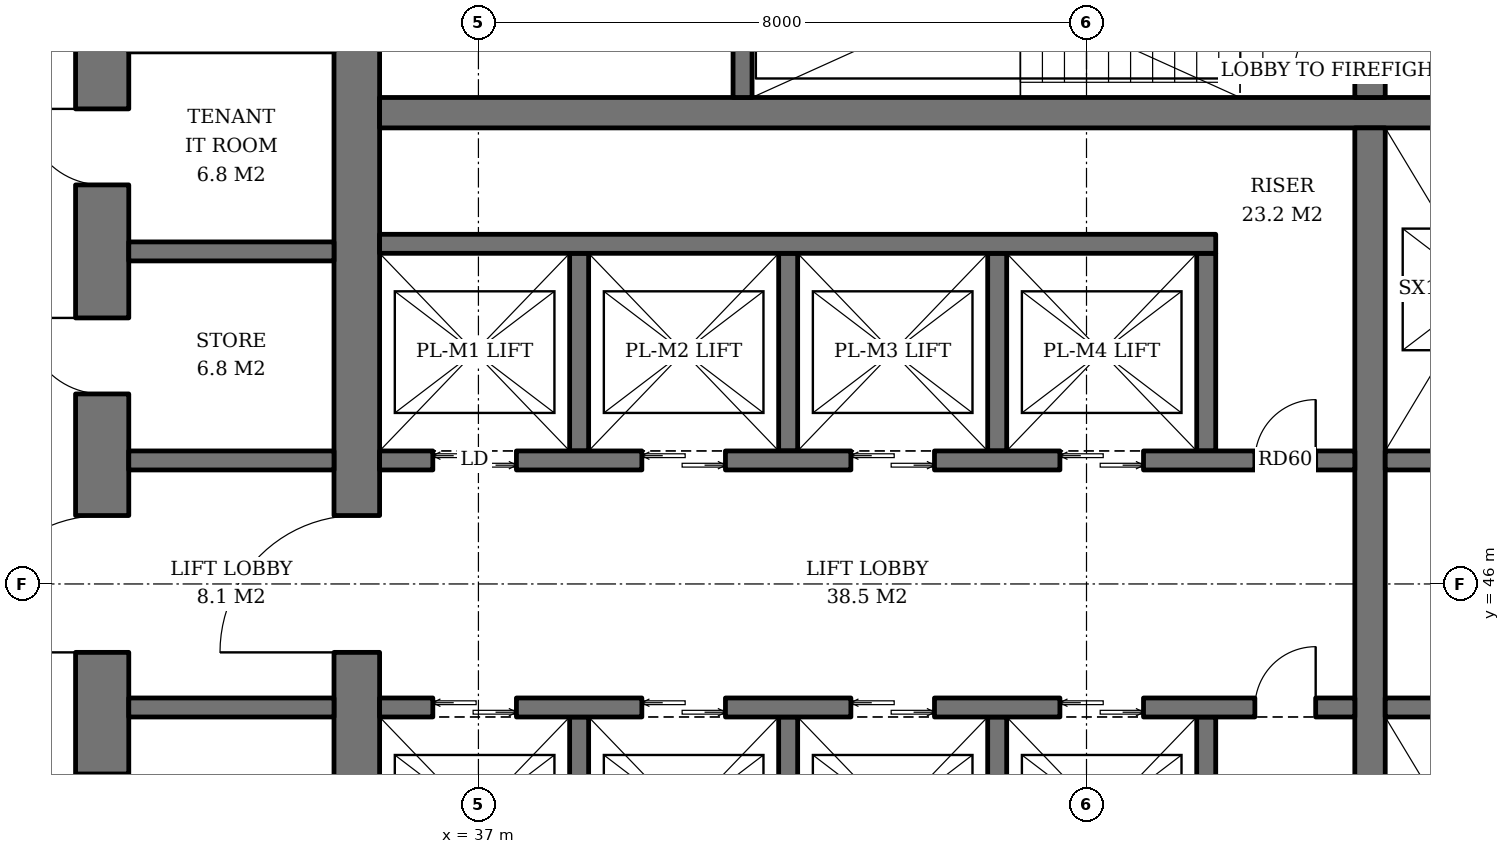
"""IFC4 building model, lengths in metres.
Left out: names, types, materials, properties, quantities, classifications, styles, units other than length and angle.
Written with IfcOpenShell. Run it as: python <this file> out.ifc"""

import sys

from ifc_helpers import new_model, si_unit, direction, frame, frame_2d, origin, place, context, subcontext, project, spatial, rectangle, extrude, element, fill, save


model = new_model("IFC4")
c1 = context("Model", 3, precision=1e-05, world=origin(), true_north=direction((0.0, 1.0)))
c2 = subcontext(c1, "Body", "Model", "MODEL_VIEW")
j1 = project(units=[si_unit("LENGTHUNIT", "METRE"), si_unit("PLANEANGLEUNIT", "RADIAN")], contexts=[c1])
p1 = place(None, origin())
s1 = spatial("IfcSite", under=j1, at=p1, CompositionType="ELEMENT")
p2 = place(p1, origin())
s2 = spatial("IfcBuilding", under=s1, at=p2, CompositionType="ELEMENT")
p3 = place(p2, frame((0.0, 0.0, 142.6)))
s3 = spatial("IfcBuildingStorey", under=s2, at=p3, CompositionType="ELEMENT", Elevation=142.6)
p4 = place(p3, frame((35.4, 36.7, 0.0), z_axis=(0.0, 0.0, 1.0), x_axis=(0.0, 1.0, 0.0)))
e1 = element("IfcWall", 1, at=p4, inside=s3, PredefinedType="SHEAR", context=c2, shape_type="SweptSolid", body=[
    extrude(rectangle(XDim=18.6, YDim=0.6, at=frame_2d((9.3, 0.0))), origin(), (0.0, 0.0, 1.0), 3.8),
])
p5 = place(p4, frame((8.4, 0.0, 0.0)))
e2 = element("IfcOpeningElement", 2, at=p5, cuts=e1, PredefinedType="OPENING", context=c2, shape_type="SweptSolid", body=[
    extrude(rectangle(XDim=1.8, YDim=2.4, at=frame_2d((0.9, 1.2))), frame((0.0, 0.31, 0.0), z_axis=(0.0, -1.0, 0.0), x_axis=(1.0, 0.0, 0.0)), (0.0, 0.0, 1.0), 0.62),
])
p6 = place(p3, frame((32.05, 33.4, 0.0), z_axis=(0.0, 0.0, 1.0), x_axis=(0.0, 1.0, 0.0)))
e3 = element("IfcWall", 3, at=p6, inside=s3, PredefinedType="SHEAR", context=c2, shape_type="SweptSolid", body=[
    extrude(rectangle(XDim=25.2, YDim=0.7, at=frame_2d((12.6, 0.0))), origin(), (0.0, 0.0, 1.0), 3.8),
])
p7 = place(p6, frame((11.7, 0.0, 0.0)))
e4 = element("IfcOpeningElement", 4, at=p7, cuts=e3, PredefinedType="OPENING", context=c2, shape_type="SweptSolid", body=[
    extrude(rectangle(XDim=1.8, YDim=2.4, at=frame_2d((0.9, 1.2))), frame((0.0, 0.36, 0.0), z_axis=(0.0, -1.0, 0.0), x_axis=(1.0, 0.0, 0.0)), (0.0, 0.0, 1.0), 0.72),
])
p8 = place(p6, frame((3.6, 0.0, 0.0)))
e5 = element("IfcOpeningElement", 5, at=p8, cuts=e3, PredefinedType="OPENING", context=c2, shape_type="SweptSolid", body=[
    extrude(rectangle(XDim=1.0, YDim=2.1, at=frame_2d((0.5, 1.05))), frame((0.0, 0.36, 0.0), z_axis=(0.0, -1.0, 0.0), x_axis=(1.0, 0.0, 0.0)), (0.0, 0.0, 1.0), 0.72),
])
p9 = place(p6, frame((6.35, 0.0, 0.0)))
e6 = element("IfcOpeningElement", 6, at=p9, cuts=e3, PredefinedType="OPENING", context=c2, shape_type="SweptSolid", body=[
    extrude(rectangle(XDim=1.0, YDim=2.1, at=frame_2d((0.5, 1.05))), frame((0.0, 0.36, 0.0), z_axis=(0.0, -1.0, 0.0), x_axis=(1.0, 0.0, 0.0)), (0.0, 0.0, 1.0), 0.72),
])
p10 = place(p6, frame((9.1, 0.0, 0.0)))
e7 = element("IfcOpeningElement", 7, at=p10, cuts=e3, PredefinedType="OPENING", context=c2, shape_type="SweptSolid", body=[
    extrude(rectangle(XDim=1.0, YDim=2.1, at=frame_2d((0.5, 1.05))), frame((0.0, 0.36, 0.0), z_axis=(0.0, -1.0, 0.0), x_axis=(1.0, 0.0, 0.0)), (0.0, 0.0, 1.0), 0.72),
])
p11 = place(p6, frame((15.1, 0.0, 0.0)))
e8 = element("IfcOpeningElement", 8, at=p11, cuts=e3, PredefinedType="OPENING", context=c2, shape_type="SweptSolid", body=[
    extrude(rectangle(XDim=1.0, YDim=2.1, at=frame_2d((0.5, 1.05))), frame((0.0, 0.36, 0.0), z_axis=(0.0, -1.0, 0.0), x_axis=(1.0, 0.0, 0.0)), (0.0, 0.0, 1.0), 0.72),
])
p12 = place(p6, frame((17.85, 0.0, 0.0)))
e9 = element("IfcOpeningElement", 9, at=p12, cuts=e3, PredefinedType="OPENING", context=c2, shape_type="SweptSolid", body=[
    extrude(rectangle(XDim=1.0, YDim=2.1, at=frame_2d((0.5, 1.05))), frame((0.0, 0.36, 0.0), z_axis=(0.0, -1.0, 0.0), x_axis=(1.0, 0.0, 0.0)), (0.0, 0.0, 1.0), 0.72),
])
p13 = place(p3, frame((35.7, 52.2, 0.0), z_axis=(0.0, 0.0, 1.0), x_axis=(1.0, 0.0, 0.0)))
e10 = element("IfcWall", 10, at=p13, inside=s3, PredefinedType="SHEAR", context=c2, shape_type="SweptSolid", body=[
    extrude(rectangle(XDim=18.6, YDim=0.4, at=frame_2d((9.3, 0.0))), origin(), (0.0, 0.0, 1.0), 3.8),
])
p14 = place(p3, frame((48.73, 40.0, 0.0), z_axis=(0.0, 0.0, 1.0), x_axis=(0.0, 1.0, 0.0)))
e11 = element("IfcWall", 11, at=p14, inside=s3, PredefinedType="SHEAR", context=c2, shape_type="SweptSolid", body=[
    extrude(rectangle(XDim=12.0, YDim=0.4, at=frame_2d((6.0, 0.0))), origin(), (0.0, 0.0, 1.0), 3.8),
])
p15 = place(p3, frame((48.73, 52.4, 0.0), z_axis=(0.0, 0.0, 1.0), x_axis=(0.0, 1.0, 0.0)))
e12 = element("IfcWall", 12, at=p15, inside=s3, PredefinedType="SHEAR", context=c2, shape_type="SweptSolid", body=[
    extrude(rectangle(XDim=2.9, YDim=0.4, at=frame_2d((1.45, 0.0))), origin(), (0.0, 0.0, 1.0), 3.8),
])
p16 = place(p15, frame((0.3, 0.0, 0.0)))
e13 = element("IfcOpeningElement", 13, at=p16, cuts=e12, PredefinedType="OPENING", context=c2, shape_type="SweptSolid", body=[
    extrude(rectangle(XDim=1.0, YDim=2.1, at=frame_2d((0.5, 1.05))), frame((0.0, 0.21, 0.0), z_axis=(0.0, -1.0, 0.0), x_axis=(1.0, 0.0, 0.0)), (0.0, 0.0, 1.0), 0.42),
])
p17 = place(p3, frame((40.475, 52.4, 0.0), z_axis=(0.0, 0.0, 1.0), x_axis=(0.0, 1.0, 0.0)))
e14 = element("IfcWall", 14, at=p17, inside=s3, PredefinedType="SHEAR", context=c2, shape_type="SweptSolid", body=[
    extrude(rectangle(XDim=2.9, YDim=0.25, at=frame_2d((1.45, 0.0))), origin(), (0.0, 0.0, 1.0), 3.8),
])
for number, where, z_axis, x_axis in (
    (15, (38.325, 47.75, 0.0), (0.0, 0.0, 1.0), (0.0, 1.0, 0.0)),
    (16, (41.075, 47.75, 0.0), (0.0, 0.0, 1.0), (0.0, 1.0, 0.0)),
    (17, (43.825, 47.75, 0.0), (0.0, 0.0, 1.0), (0.0, 1.0, 0.0)),
    (18, (46.575, 47.75, 0.0), (0.0, 0.0, 1.0), (0.0, 1.0, 0.0)),
):
    element("IfcWall", number, at=place(p3, frame(where, z_axis=z_axis, x_axis=x_axis)), inside=s3, PredefinedType="SHEAR", context=c2, shape_type="SweptSolid", body=[
        extrude(rectangle(XDim=2.6, YDim=0.25, at=frame_2d((1.3, 0.0))), origin(), (0.0, 0.0, 1.0), 3.8),
    ])
p18 = place(p3, frame((35.7, 50.475, 0.0), z_axis=(0.0, 0.0, 1.0), x_axis=(1.0, 0.0, 0.0)))
e19 = element("IfcWall", 19, at=p18, inside=s3, PredefinedType="SHEAR", context=c2, shape_type="SweptSolid", body=[
    extrude(rectangle(XDim=11.0, YDim=0.25, at=frame_2d((5.5, 0.0))), origin(), (0.0, 0.0, 1.0), 3.8),
])
p19 = place(p3, frame((35.7, 47.625, 0.0), z_axis=(0.0, 0.0, 1.0), x_axis=(1.0, 0.0, 0.0)))
e20 = element("IfcWall", 20, at=p19, inside=s3, PredefinedType="SHEAR", context=c2, shape_type="SweptSolid", body=[
    extrude(rectangle(XDim=12.83, YDim=0.25, at=frame_2d((6.415, 0.0))), origin(), (0.0, 0.0, 1.0), 3.8),
])
p20 = place(p19, frame((0.7, 0.0, 0.0)))
e21 = element("IfcOpeningElement", 21, at=p20, cuts=e20, PredefinedType="OPENING", context=c2, shape_type="SweptSolid", body=[
    extrude(rectangle(XDim=1.1, YDim=2.2, at=frame_2d((0.55, 1.1))), frame((0.0, 0.135, 0.0), z_axis=(0.0, -1.0, 0.0), x_axis=(1.0, 0.0, 0.0)), (0.0, 0.0, 1.0), 0.27),
])
p21 = place(p19, frame((3.45, 0.0, 0.0)))
e22 = element("IfcOpeningElement", 22, at=p21, cuts=e20, PredefinedType="OPENING", context=c2, shape_type="SweptSolid", body=[
    extrude(rectangle(XDim=1.1, YDim=2.2, at=frame_2d((0.55, 1.1))), frame((0.0, 0.135, 0.0), z_axis=(0.0, -1.0, 0.0), x_axis=(1.0, 0.0, 0.0)), (0.0, 0.0, 1.0), 0.27),
])
p22 = place(p19, frame((6.2, 0.0, 0.0)))
e23 = element("IfcOpeningElement", 23, at=p22, cuts=e20, PredefinedType="OPENING", context=c2, shape_type="SweptSolid", body=[
    extrude(rectangle(XDim=1.1, YDim=2.2, at=frame_2d((0.55, 1.1))), frame((0.0, 0.135, 0.0), z_axis=(0.0, -1.0, 0.0), x_axis=(1.0, 0.0, 0.0)), (0.0, 0.0, 1.0), 0.27),
])
p23 = place(p19, frame((8.95, 0.0, 0.0)))
e24 = element("IfcOpeningElement", 24, at=p23, cuts=e20, PredefinedType="OPENING", context=c2, shape_type="SweptSolid", body=[
    extrude(rectangle(XDim=1.1, YDim=2.2, at=frame_2d((0.55, 1.1))), frame((0.0, 0.135, 0.0), z_axis=(0.0, -1.0, 0.0), x_axis=(1.0, 0.0, 0.0)), (0.0, 0.0, 1.0), 0.27),
])
p24 = place(p19, frame((11.515, 0.0, 0.0)))
e25 = element("IfcOpeningElement", 25, at=p24, cuts=e20, PredefinedType="OPENING", context=c2, shape_type="SweptSolid", body=[
    extrude(rectangle(XDim=0.8, YDim=2.0, at=frame_2d((0.4, 1.0))), frame((0.0, 0.135, 0.0), z_axis=(0.0, -1.0, 0.0), x_axis=(1.0, 0.0, 0.0)), (0.0, 0.0, 1.0), 0.27),
])
for number, where, z_axis, x_axis in (
    (26, (38.325, 44.25, 0.0), (0.0, 0.0, 1.0), (0.0, -1.0, 0.0)),
    (27, (41.075, 44.25, 0.0), (0.0, 0.0, 1.0), (0.0, -1.0, 0.0)),
    (28, (43.825, 44.25, 0.0), (0.0, 0.0, 1.0), (0.0, -1.0, 0.0)),
    (29, (46.575, 44.25, 0.0), (0.0, 0.0, 1.0), (0.0, -1.0, 0.0)),
):
    element("IfcWall", number, at=place(p3, frame(where, z_axis=z_axis, x_axis=x_axis)), inside=s3, PredefinedType="SHEAR", context=c2, shape_type="SweptSolid", body=[
        extrude(rectangle(XDim=2.6, YDim=0.25, at=frame_2d((1.3, 0.0))), origin(), (0.0, 0.0, 1.0), 3.8),
    ])
p25 = place(p3, frame((35.7, 44.375, 0.0), z_axis=(0.0, 0.0, 1.0), x_axis=(1.0, 0.0, 0.0)))
e30 = element("IfcWall", 30, at=p25, inside=s3, PredefinedType="SHEAR", context=c2, shape_type="SweptSolid", body=[
    extrude(rectangle(XDim=12.83, YDim=0.25, at=frame_2d((6.415, 0.0))), origin(), (0.0, 0.0, 1.0), 3.8),
])
p26 = place(p25, frame((0.7, 0.0, 0.0)))
e31 = element("IfcOpeningElement", 31, at=p26, cuts=e30, PredefinedType="OPENING", context=c2, shape_type="SweptSolid", body=[
    extrude(rectangle(XDim=1.1, YDim=2.2, at=frame_2d((0.55, 1.1))), frame((0.0, 0.135, 0.0), z_axis=(0.0, -1.0, 0.0), x_axis=(1.0, 0.0, 0.0)), (0.0, 0.0, 1.0), 0.27),
])
p27 = place(p25, frame((3.45, 0.0, 0.0)))
e32 = element("IfcOpeningElement", 32, at=p27, cuts=e30, PredefinedType="OPENING", context=c2, shape_type="SweptSolid", body=[
    extrude(rectangle(XDim=1.1, YDim=2.2, at=frame_2d((0.55, 1.1))), frame((0.0, 0.135, 0.0), z_axis=(0.0, -1.0, 0.0), x_axis=(1.0, 0.0, 0.0)), (0.0, 0.0, 1.0), 0.27),
])
p28 = place(p25, frame((6.2, 0.0, 0.0)))
e33 = element("IfcOpeningElement", 33, at=p28, cuts=e30, PredefinedType="OPENING", context=c2, shape_type="SweptSolid", body=[
    extrude(rectangle(XDim=1.1, YDim=2.2, at=frame_2d((0.55, 1.1))), frame((0.0, 0.135, 0.0), z_axis=(0.0, -1.0, 0.0), x_axis=(1.0, 0.0, 0.0)), (0.0, 0.0, 1.0), 0.27),
])
p29 = place(p25, frame((8.95, 0.0, 0.0)))
e34 = element("IfcOpeningElement", 34, at=p29, cuts=e30, PredefinedType="OPENING", context=c2, shape_type="SweptSolid", body=[
    extrude(rectangle(XDim=1.1, YDim=2.2, at=frame_2d((0.55, 1.1))), frame((0.0, 0.135, 0.0), z_axis=(0.0, -1.0, 0.0), x_axis=(1.0, 0.0, 0.0)), (0.0, 0.0, 1.0), 0.27),
])
p30 = place(p25, frame((11.515, 0.0, 0.0)))
e35 = element("IfcOpeningElement", 35, at=p30, cuts=e30, PredefinedType="OPENING", context=c2, shape_type="SweptSolid", body=[
    extrude(rectangle(XDim=0.8, YDim=2.0, at=frame_2d((0.4, 1.0))), frame((0.0, 0.135, 0.0), z_axis=(0.0, -1.0, 0.0), x_axis=(1.0, 0.0, 0.0)), (0.0, 0.0, 1.0), 0.27),
])
for number, where, z_axis, x_axis in (
    (36, (48.93, 47.625, 0.0), (0.0, 0.0, 1.0), (1.0, 0.0, 0.0)),
    (37, (48.93, 44.375, 0.0), (0.0, 0.0, 1.0), (1.0, 0.0, 0.0)),
):
    element("IfcWall", number, at=place(p3, frame(where, z_axis=z_axis, x_axis=x_axis)), inside=s3, PredefinedType="SHEAR", context=c2, shape_type="SweptSolid", body=[
        extrude(rectangle(XDim=5.37, YDim=0.25, at=frame_2d((2.685, 0.0))), origin(), (0.0, 0.0, 1.0), 3.8),
    ])
for number, where, z_axis, x_axis in (
    (38, (32.4, 44.375, 0.0), (0.0, 0.0, 1.0), (1.0, 0.0, 0.0)),
    (39, (32.4, 47.625, 0.0), (0.0, 0.0, 1.0), (1.0, 0.0, 0.0)),
    (40, (32.4, 50.375, 0.0), (0.0, 0.0, 1.0), (1.0, 0.0, 0.0)),
):
    element("IfcWall", number, at=place(p3, frame(where, z_axis=z_axis, x_axis=x_axis)), inside=s3, PredefinedType="SHEAR", context=c2, shape_type="SweptSolid", body=[
        extrude(rectangle(XDim=2.7, YDim=0.25, at=frame_2d((1.35, 0.0))), origin(), (0.0, 0.0, 1.0), 3.8),
    ])
p31 = place(p20, origin())
e41 = element("IfcDoor", 41, at=p31, inside=s3, OperationType="DOUBLE_DOOR_SLIDING", PredefinedType="DOOR", context=c2, shape_type="SweptSolid", body=[
    extrude(rectangle(XDim=1.1, YDim=2.2, at=frame_2d((0.55, 1.1))), frame((0.0, 0.025, 0.0), z_axis=(0.0, -1.0, 0.0), x_axis=(1.0, 0.0, 0.0)), (0.0, 0.0, 1.0), 0.05),
])
fill(e21, e41)
p32 = place(p21, origin())
e42 = element("IfcDoor", 42, at=p32, inside=s3, OperationType="DOUBLE_DOOR_SLIDING", PredefinedType="DOOR", context=c2, shape_type="SweptSolid", body=[
    extrude(rectangle(XDim=1.1, YDim=2.2, at=frame_2d((0.55, 1.1))), frame((0.0, 0.025, 0.0), z_axis=(0.0, -1.0, 0.0), x_axis=(1.0, 0.0, 0.0)), (0.0, 0.0, 1.0), 0.05),
])
fill(e22, e42)
p33 = place(p22, origin())
e43 = element("IfcDoor", 43, at=p33, inside=s3, OperationType="DOUBLE_DOOR_SLIDING", PredefinedType="DOOR", context=c2, shape_type="SweptSolid", body=[
    extrude(rectangle(XDim=1.1, YDim=2.2, at=frame_2d((0.55, 1.1))), frame((0.0, 0.025, 0.0), z_axis=(0.0, -1.0, 0.0), x_axis=(1.0, 0.0, 0.0)), (0.0, 0.0, 1.0), 0.05),
])
fill(e23, e43)
p34 = place(p23, origin())
e44 = element("IfcDoor", 44, at=p34, inside=s3, OperationType="DOUBLE_DOOR_SLIDING", PredefinedType="DOOR", context=c2, shape_type="SweptSolid", body=[
    extrude(rectangle(XDim=1.1, YDim=2.2, at=frame_2d((0.55, 1.1))), frame((0.0, 0.025, 0.0), z_axis=(0.0, -1.0, 0.0), x_axis=(1.0, 0.0, 0.0)), (0.0, 0.0, 1.0), 0.05),
])
fill(e24, e44)
p35 = place(p24, origin())
e45 = element("IfcDoor", 45, at=p35, inside=s3, OperationType="SINGLE_SWING_RIGHT", PredefinedType="DOOR", context=c2, shape_type="SweptSolid", body=[
    extrude(rectangle(XDim=0.8, YDim=2.0, at=frame_2d((0.4, 1.0))), frame((0.0, 0.025, 0.0), z_axis=(0.0, -1.0, 0.0), x_axis=(1.0, 0.0, 0.0)), (0.0, 0.0, 1.0), 0.05),
])
fill(e25, e45)
p36 = place(p26, origin())
e46 = element("IfcDoor", 46, at=p36, inside=s3, OperationType="DOUBLE_DOOR_SLIDING", PredefinedType="DOOR", context=c2, shape_type="SweptSolid", body=[
    extrude(rectangle(XDim=1.1, YDim=2.2, at=frame_2d((0.55, 1.1))), frame((0.0, 0.025, 0.0), z_axis=(0.0, -1.0, 0.0), x_axis=(1.0, 0.0, 0.0)), (0.0, 0.0, 1.0), 0.05),
])
fill(e31, e46)
p37 = place(p27, origin())
e47 = element("IfcDoor", 47, at=p37, inside=s3, OperationType="DOUBLE_DOOR_SLIDING", PredefinedType="DOOR", context=c2, shape_type="SweptSolid", body=[
    extrude(rectangle(XDim=1.1, YDim=2.2, at=frame_2d((0.55, 1.1))), frame((0.0, 0.025, 0.0), z_axis=(0.0, -1.0, 0.0), x_axis=(1.0, 0.0, 0.0)), (0.0, 0.0, 1.0), 0.05),
])
fill(e32, e47)
p38 = place(p28, origin())
e48 = element("IfcDoor", 48, at=p38, inside=s3, OperationType="DOUBLE_DOOR_SLIDING", PredefinedType="DOOR", context=c2, shape_type="SweptSolid", body=[
    extrude(rectangle(XDim=1.1, YDim=2.2, at=frame_2d((0.55, 1.1))), frame((0.0, 0.025, 0.0), z_axis=(0.0, -1.0, 0.0), x_axis=(1.0, 0.0, 0.0)), (0.0, 0.0, 1.0), 0.05),
])
fill(e33, e48)
p39 = place(p29, origin())
e49 = element("IfcDoor", 49, at=p39, inside=s3, OperationType="DOUBLE_DOOR_SLIDING", PredefinedType="DOOR", context=c2, shape_type="SweptSolid", body=[
    extrude(rectangle(XDim=1.1, YDim=2.2, at=frame_2d((0.55, 1.1))), frame((0.0, 0.025, 0.0), z_axis=(0.0, -1.0, 0.0), x_axis=(1.0, 0.0, 0.0)), (0.0, 0.0, 1.0), 0.05),
])
fill(e34, e49)
p40 = place(p30, origin())
e50 = element("IfcDoor", 50, at=p40, inside=s3, OperationType="SINGLE_SWING_RIGHT", PredefinedType="DOOR", context=c2, shape_type="SweptSolid", body=[
    extrude(rectangle(XDim=0.8, YDim=2.0, at=frame_2d((0.4, 1.0))), frame((0.0, 0.025, 0.0), z_axis=(0.0, -1.0, 0.0), x_axis=(1.0, 0.0, 0.0)), (0.0, 0.0, 1.0), 0.05),
])
fill(e35, e50)
p41 = place(p16, origin())
e51 = element("IfcDoor", 51, at=p41, inside=s3, OperationType="SINGLE_SWING_LEFT", PredefinedType="DOOR", context=c2, shape_type="SweptSolid", body=[
    extrude(rectangle(XDim=1.0, YDim=2.1, at=frame_2d((0.5, 1.05))), frame((0.0, 0.025, 0.0), z_axis=(0.0, -1.0, 0.0), x_axis=(1.0, 0.0, 0.0)), (0.0, 0.0, 1.0), 0.05),
])
fill(e13, e51)
p42 = place(p5, origin())
e52 = element("IfcDoor", 52, at=p42, inside=s3, OperationType="DOUBLE_DOOR_SINGLE_SWING", PredefinedType="DOOR", context=c2, shape_type="SweptSolid", body=[
    extrude(rectangle(XDim=1.8, YDim=2.4, at=frame_2d((0.9, 1.2))), frame((0.0, 0.025, 0.0), z_axis=(0.0, -1.0, 0.0), x_axis=(1.0, 0.0, 0.0)), (0.0, 0.0, 1.0), 0.05),
])
fill(e2, e52)
p43 = place(p7, origin())
e53 = element("IfcDoor", 53, at=p43, inside=s3, OperationType="DOUBLE_DOOR_SINGLE_SWING", PredefinedType="DOOR", context=c2, shape_type="SweptSolid", body=[
    extrude(rectangle(XDim=1.8, YDim=2.4, at=frame_2d((0.9, 1.2))), frame((0.0, 0.025, 0.0), z_axis=(0.0, -1.0, 0.0), x_axis=(1.0, 0.0, 0.0)), (0.0, 0.0, 1.0), 0.05),
])
fill(e4, e53)
p44 = place(p11, origin())
e54 = element("IfcDoor", 54, at=p44, inside=s3, OperationType="SINGLE_SWING_RIGHT", PredefinedType="DOOR", context=c2, shape_type="SweptSolid", body=[
    extrude(rectangle(XDim=1.0, YDim=2.1, at=frame_2d((0.5, 1.05))), frame((0.0, -0.29, 0.0), z_axis=(0.0, -1.0, 0.0), x_axis=(1.0, 0.0, 0.0)), (0.0, 0.0, 1.0), 0.05),
])
fill(e8, e54)
p45 = place(p12, origin())
e55 = element("IfcDoor", 55, at=p45, inside=s3, OperationType="SINGLE_SWING_RIGHT", PredefinedType="DOOR", context=c2, shape_type="SweptSolid", body=[
    extrude(rectangle(XDim=1.0, YDim=2.1, at=frame_2d((0.5, 1.05))), frame((0.0, -0.29, 0.0), z_axis=(0.0, -1.0, 0.0), x_axis=(1.0, 0.0, 0.0)), (0.0, 0.0, 1.0), 0.05),
])
fill(e9, e55)
save(model, sys.argv[1])
